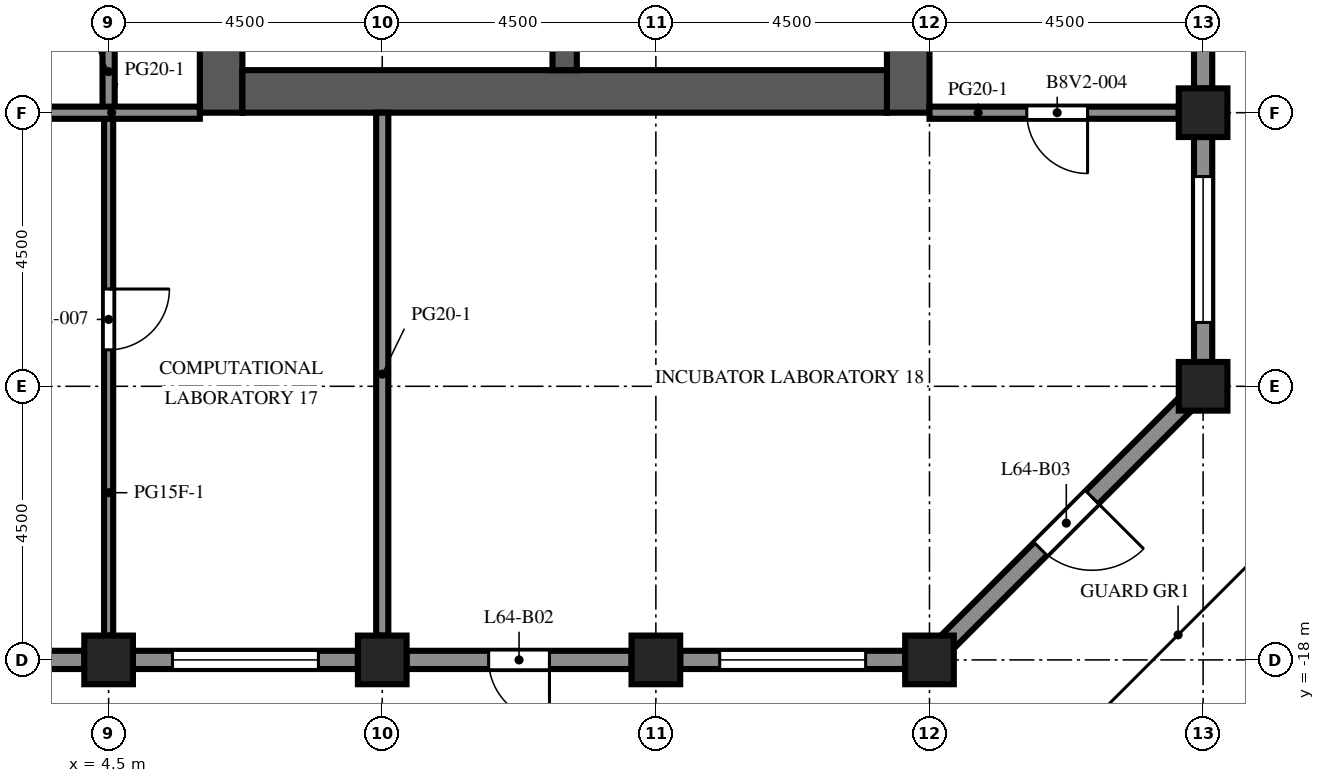
"""IFC4 building model, lengths in metres.
Left out: names, types, materials, properties, quantities, classifications, styles, units other than length and angle.
Written with IfcOpenShell. Run it as: python <this file> out.ifc"""

import sys

from ifc_helpers import new_model, si_unit, direction, frame, frame_2d, origin, origin_2d, place, context, subcontext, project, spatial, rectangle, extrude, element, fill, save


model = new_model("IFC4")
c1 = context("Model", 3, precision=1e-05, world=origin(), true_north=direction((0.0, 1.0)))
c2 = subcontext(c1, "Body", "Model", "MODEL_VIEW")
j1 = project(units=[si_unit("LENGTHUNIT", "METRE"), si_unit("PLANEANGLEUNIT", "RADIAN")], contexts=[c1])
p1 = place(None, origin())
s1 = spatial("IfcSite", under=j1, at=p1, CompositionType="ELEMENT")
p2 = place(p1, origin())
s2 = spatial("IfcBuilding", under=s1, at=p2, CompositionType="ELEMENT")
p3 = place(p2, frame((0.0, 0.0, 282.7)))
s3 = spatial("IfcBuildingStorey", under=s2, at=p3, CompositionType="ELEMENT", Elevation=282.7)
for number, where, z_axis, x_axis in (
    (1, (4.5, -18.0, 0.0), (0.0, 0.0, 1.0), (1.0, 0.0, 0.0)),
    (2, (9.0, -18.0, 0.0), (0.0, 0.0, 1.0), (1.0, 0.0, 0.0)),
    (3, (13.5, -18.0, 0.0), (0.0, 0.0, 1.0), (1.0, 0.0, 0.0)),
    (4, (18.0, -18.0, 0.0), (0.0, 0.0, 1.0), (1.0, 0.0, 0.0)),
    (5, (22.5, -13.5, 0.0), (0.0, 0.0, 1.0), (1.0, 0.0, 0.0)),
    (6, (22.5, -9.0, 0.0), (0.0, 0.0, 1.0), (1.0, 0.0, 0.0)),
):
    element("IfcColumn", number, at=place(p3, frame(where, z_axis=z_axis, x_axis=x_axis)), inside=s3, PredefinedType="COLUMN", context=c2, shape_type="SweptSolid", body=[
        extrude(rectangle(XDim=0.8, YDim=0.8, at=origin_2d()), origin(), (0.0, 0.0, 1.0), 4.1),
    ])
p4 = place(p3, frame((6.35, -9.0, 0.0), z_axis=(0.0, 0.0, 1.0), x_axis=(0.0, 1.0, 0.0)))
e7 = element("IfcWall", 7, at=p4, inside=s3, PredefinedType="SHEAR", context=c2, shape_type="SweptSolid", body=[
    extrude(rectangle(XDim=27.5, YDim=0.7, at=frame_2d((13.75, 0.0))), origin(), (0.0, 0.0, 1.0), 4.1),
])
p5 = place(p4, frame((12.55, 0.0, 0.0)))
e8 = element("IfcOpeningElement", 8, at=p5, cuts=e7, PredefinedType="OPENING", context=c2, shape_type="SweptSolid", body=[
    extrude(rectangle(XDim=2.4, YDim=2.4, at=frame_2d((1.2, 1.2))), frame((0.0, 0.36, 0.0), z_axis=(0.0, -1.0, 0.0), x_axis=(1.0, 0.0, 0.0)), (0.0, 0.0, 1.0), 0.72),
])
p6 = place(p4, frame((3.9, 0.0, 0.0)))
e9 = element("IfcOpeningElement", 9, at=p6, cuts=e7, PredefinedType="OPENING", context=c2, shape_type="SweptSolid", body=[
    extrude(rectangle(XDim=1.2, YDim=2.1, at=frame_2d((0.6, 1.05))), frame((0.0, 0.36, 0.0), z_axis=(0.0, -1.0, 0.0), x_axis=(1.0, 0.0, 0.0)), (0.0, 0.0, 1.0), 0.72),
])
p7 = place(p4, frame((22.4, 0.0, 0.0)))
e10 = element("IfcOpeningElement", 10, at=p7, cuts=e7, PredefinedType="OPENING", context=c2, shape_type="SweptSolid", body=[
    extrude(rectangle(XDim=1.2, YDim=2.1, at=frame_2d((0.6, 1.05))), frame((0.0, 0.36, 0.0), z_axis=(0.0, -1.0, 0.0), x_axis=(1.0, 0.0, 0.0)), (0.0, 0.0, 1.0), 0.72),
])
p8 = place(p3, frame((17.65, -9.0, 0.0), z_axis=(0.0, 0.0, 1.0), x_axis=(0.0, 1.0, 0.0)))
e11 = element("IfcWall", 11, at=p8, inside=s3, PredefinedType="SHEAR", context=c2, shape_type="SweptSolid", body=[
    extrude(rectangle(XDim=27.5, YDim=0.7, at=frame_2d((13.75, 0.0))), origin(), (0.0, 0.0, 1.0), 4.1),
])
p9 = place(p8, frame((12.55, 0.0, 0.0)))
e12 = element("IfcOpeningElement", 12, at=p9, cuts=e11, PredefinedType="OPENING", context=c2, shape_type="SweptSolid", body=[
    extrude(rectangle(XDim=2.4, YDim=2.4, at=frame_2d((1.2, 1.2))), frame((0.0, 0.36, 0.0), z_axis=(0.0, -1.0, 0.0), x_axis=(1.0, 0.0, 0.0)), (0.0, 0.0, 1.0), 0.72),
])
p10 = place(p8, frame((6.825, 0.0, 0.0)))
e13 = element("IfcOpeningElement", 13, at=p10, cuts=e11, PredefinedType="OPENING", context=c2, shape_type="SweptSolid", body=[
    extrude(rectangle(XDim=1.2, YDim=2.1, at=frame_2d((0.6, 1.05))), frame((0.0, 0.36, 0.0), z_axis=(0.0, -1.0, 0.0), x_axis=(1.0, 0.0, 0.0)), (0.0, 0.0, 1.0), 0.72),
])
p11 = place(p8, frame((19.475, 0.0, 0.0)))
e14 = element("IfcOpeningElement", 14, at=p11, cuts=e11, PredefinedType="OPENING", context=c2, shape_type="SweptSolid", body=[
    extrude(rectangle(XDim=1.2, YDim=2.1, at=frame_2d((0.6, 1.05))), frame((0.0, 0.36, 0.0), z_axis=(0.0, -1.0, 0.0), x_axis=(1.0, 0.0, 0.0)), (0.0, 0.0, 1.0), 0.72),
])
p12 = place(p3, frame((6.7, -8.65, 0.0), z_axis=(0.0, 0.0, 1.0), x_axis=(1.0, 0.0, 0.0)))
e15 = element("IfcWall", 15, at=p12, inside=s3, PredefinedType="SHEAR", context=c2, shape_type="SweptSolid", body=[
    extrude(rectangle(XDim=10.6, YDim=0.7, at=frame_2d((5.3, 0.0))), origin(), (0.0, 0.0, 1.0), 4.1),
])
p13 = place(p3, frame((12.0, -8.3, 0.0), z_axis=(0.0, 0.0, 1.0), x_axis=(0.0, 1.0, 0.0)))
e16 = element("IfcWall", 16, at=p13, inside=s3, PredefinedType="SHEAR", context=c2, shape_type="SweptSolid", body=[
    extrude(rectangle(XDim=7.6, YDim=0.4, at=frame_2d((3.8, 0.0))), origin(), (0.0, 0.0, 1.0), 4.1),
])
p14 = place(p3, frame((4.1, -18.0, 0.0), z_axis=(0.0, 0.0, 1.0), x_axis=(-1.0, 0.0, 0.0)))
e17 = element("IfcWall", 17, at=p14, inside=s3, PredefinedType="SOLIDWALL", context=c2, shape_type="SweptSolid", body=[
    extrude(rectangle(XDim=3.7, YDim=0.3, at=frame_2d((1.85, 0.0))), origin(), (0.0, 0.0, 1.0), 2.85),
])
p15 = place(p14, frame((0.65, 0.0, 0.8)))
e18 = element("IfcOpeningElement", 18, at=p15, cuts=e17, PredefinedType="OPENING", context=c2, shape_type="SweptSolid", body=[
    extrude(rectangle(XDim=2.4, YDim=1.7, at=frame_2d((1.2, 0.85))), frame((0.0, 0.16, 0.0), z_axis=(0.0, -1.0, 0.0), x_axis=(1.0, 0.0, 0.0)), (0.0, 0.0, 1.0), 0.32),
])
p16 = place(p3, frame((8.6, -18.0, 0.0), z_axis=(0.0, 0.0, 1.0), x_axis=(-1.0, 0.0, 0.0)))
e19 = element("IfcWall", 19, at=p16, inside=s3, PredefinedType="SOLIDWALL", context=c2, shape_type="SweptSolid", body=[
    extrude(rectangle(XDim=3.7, YDim=0.3, at=frame_2d((1.85, 0.0))), origin(), (0.0, 0.0, 1.0), 2.85),
])
p17 = place(p16, frame((0.65, 0.0, 0.8)))
e20 = element("IfcOpeningElement", 20, at=p17, cuts=e19, PredefinedType="OPENING", context=c2, shape_type="SweptSolid", body=[
    extrude(rectangle(XDim=2.4, YDim=1.7, at=frame_2d((1.2, 0.85))), frame((0.0, 0.16, 0.0), z_axis=(0.0, -1.0, 0.0), x_axis=(1.0, 0.0, 0.0)), (0.0, 0.0, 1.0), 0.32),
])
p18 = place(p3, frame((13.1, -18.0, 0.0), z_axis=(0.0, 0.0, 1.0), x_axis=(-1.0, 0.0, 0.0)))
e21 = element("IfcWall", 21, at=p18, inside=s3, PredefinedType="SOLIDWALL", context=c2, shape_type="SweptSolid", body=[
    extrude(rectangle(XDim=3.7, YDim=0.3, at=frame_2d((1.85, 0.0))), origin(), (0.0, 0.0, 1.0), 2.85),
])
p19 = place(p18, frame((1.35, 0.0, 0.0)))
e22 = element("IfcOpeningElement", 22, at=p19, cuts=e21, PredefinedType="OPENING", context=c2, shape_type="SweptSolid", body=[
    extrude(rectangle(XDim=1.0, YDim=2.2, at=frame_2d((0.5, 1.1))), frame((0.0, 0.16, 0.0), z_axis=(0.0, -1.0, 0.0), x_axis=(1.0, 0.0, 0.0)), (0.0, 0.0, 1.0), 0.32),
])
p20 = place(p3, frame((17.6, -18.0, 0.0), z_axis=(0.0, 0.0, 1.0), x_axis=(-1.0, 0.0, 0.0)))
e23 = element("IfcWall", 23, at=p20, inside=s3, PredefinedType="SOLIDWALL", context=c2, shape_type="SweptSolid", body=[
    extrude(rectangle(XDim=3.7, YDim=0.3, at=frame_2d((1.85, 0.0))), origin(), (0.0, 0.0, 1.0), 2.85),
])
p21 = place(p20, frame((0.65, 0.0, 0.8)))
e24 = element("IfcOpeningElement", 24, at=p21, cuts=e23, PredefinedType="OPENING", context=c2, shape_type="SweptSolid", body=[
    extrude(rectangle(XDim=2.4, YDim=1.7, at=frame_2d((1.2, 0.85))), frame((0.0, 0.16, 0.0), z_axis=(0.0, -1.0, 0.0), x_axis=(1.0, 0.0, 0.0)), (0.0, 0.0, 1.0), 0.32),
])
p22 = place(p3, frame((22.206, -13.794, 0.0), z_axis=(0.0, 0.0, 1.0), x_axis=(-0.707106781187, -0.707106781187, 0.0)))
e25 = element("IfcWall", 25, at=p22, inside=s3, PredefinedType="SOLIDWALL", context=c2, shape_type="SweptSolid", body=[
    extrude(rectangle(XDim=5.532, YDim=0.3, at=frame_2d((2.766, 0.0))), origin(), (0.0, 0.0, 1.0), 2.85),
])
p23 = place(p22, frame((2.166, 0.0, 0.0)))
e26 = element("IfcOpeningElement", 26, at=p23, cuts=e25, PredefinedType="OPENING", context=c2, shape_type="SweptSolid", body=[
    extrude(rectangle(XDim=1.2, YDim=2.2, at=frame_2d((0.6, 1.1))), frame((0.0, 0.16, 0.0), z_axis=(0.0, -1.0, 0.0), x_axis=(1.0, 0.0, 0.0)), (0.0, 0.0, 1.0), 0.32),
])
p24 = place(p3, frame((22.5, -9.4, 0.0), z_axis=(0.0, 0.0, 1.0), x_axis=(0.0, -1.0, 0.0)))
e27 = element("IfcWall", 27, at=p24, inside=s3, PredefinedType="SOLIDWALL", context=c2, shape_type="SweptSolid", body=[
    extrude(rectangle(XDim=3.7, YDim=0.3, at=frame_2d((1.85, 0.0))), origin(), (0.0, 0.0, 1.0), 2.85),
])
p25 = place(p24, frame((0.65, 0.0, 0.8)))
e28 = element("IfcOpeningElement", 28, at=p25, cuts=e27, PredefinedType="OPENING", context=c2, shape_type="SweptSolid", body=[
    extrude(rectangle(XDim=2.4, YDim=1.7, at=frame_2d((1.2, 0.85))), frame((0.0, 0.16, 0.0), z_axis=(0.0, -1.0, 0.0), x_axis=(1.0, 0.0, 0.0)), (0.0, 0.0, 1.0), 0.32),
])
p26 = place(p3, frame((22.5, -4.9, 0.0), z_axis=(0.0, 0.0, 1.0), x_axis=(0.0, -1.0, 0.0)))
e29 = element("IfcWall", 29, at=p26, inside=s3, PredefinedType="SOLIDWALL", context=c2, shape_type="SweptSolid", body=[
    extrude(rectangle(XDim=3.7, YDim=0.3, at=frame_2d((1.85, 0.0))), origin(), (0.0, 0.0, 1.0), 2.85),
])
p27 = place(p26, frame((1.35, 0.0, 0.0)))
e30 = element("IfcOpeningElement", 30, at=p27, cuts=e29, PredefinedType="OPENING", context=c2, shape_type="SweptSolid", body=[
    extrude(rectangle(XDim=1.0, YDim=2.2, at=frame_2d((0.5, 1.1))), frame((0.0, 0.16, 0.0), z_axis=(0.0, -1.0, 0.0), x_axis=(1.0, 0.0, 0.0)), (0.0, 0.0, 1.0), 0.32),
])
p28 = place(p3, frame((8.2, -8.3, 0.0), z_axis=(0.0, 0.0, 1.0), x_axis=(0.0, 1.0, 0.0)))
e31 = element("IfcWall", 31, at=p28, inside=s3, PredefinedType="PARTITIONING", context=c2, shape_type="SweptSolid", body=[
    extrude(rectangle(XDim=2.28, YDim=0.1, at=frame_2d((1.14, 0.0))), origin(), (0.0, 0.0, 1.0), 3.65),
])
p29 = place(p28, frame((0.64, 0.0, 0.0)))
e32 = element("IfcOpeningElement", 32, at=p29, cuts=e31, PredefinedType="OPENING", context=c2, shape_type="SweptSolid", body=[
    extrude(rectangle(XDim=1.0, YDim=2.1, at=frame_2d((0.5, 1.05))), frame((0.0, 0.06, 0.0), z_axis=(0.0, -1.0, 0.0), x_axis=(1.0, 0.0, 0.0)), (0.0, 0.0, 1.0), 0.12),
])
p30 = place(p3, frame((4.5, -9.0, 0.0), z_axis=(0.0, 0.0, 1.0), x_axis=(0.0, -1.0, 0.0)))
e33 = element("IfcWall", 33, at=p30, inside=s3, PredefinedType="PARTITIONING", context=c2, shape_type="SweptSolid", body=[
    extrude(rectangle(XDim=8.6, YDim=0.15, at=frame_2d((4.3, 0.0))), origin(), (0.0, 0.0, 1.0), 3.65),
])
p31 = place(p30, frame((2.9, 0.0, 0.0)))
e34 = element("IfcOpeningElement", 34, at=p31, cuts=e33, PredefinedType="OPENING", context=c2, shape_type="SweptSolid", body=[
    extrude(rectangle(XDim=1.0, YDim=2.1, at=frame_2d((0.5, 1.05))), frame((0.0, 0.085, 0.0), z_axis=(0.0, -1.0, 0.0), x_axis=(1.0, 0.0, 0.0)), (0.0, 0.0, 1.0), 0.17),
])
p32 = place(p3, frame((4.5, -6.0, 0.0), z_axis=(0.0, 0.0, 1.0), x_axis=(0.0, -1.0, 0.0)))
e35 = element("IfcWall", 35, at=p32, inside=s3, PredefinedType="PARTITIONING", context=c2, shape_type="SweptSolid", body=[
    extrude(rectangle(XDim=3.0, YDim=0.2, at=frame_2d((1.5, 0.0))), origin(), (0.0, 0.0, 1.0), 3.65),
])
p33 = place(p32, frame((0.65, 0.0, 0.0)))
e36 = element("IfcOpeningElement", 36, at=p33, cuts=e35, PredefinedType="OPENING", context=c2, shape_type="SweptSolid", body=[
    extrude(rectangle(XDim=1.0, YDim=2.1, at=frame_2d((0.5, 1.05))), frame((0.0, 0.11, 0.0), z_axis=(0.0, -1.0, 0.0), x_axis=(1.0, 0.0, 0.0)), (0.0, 0.0, 1.0), 0.22),
])
p34 = place(p3, frame((9.0, -17.6, 0.0), z_axis=(0.0, 0.0, 1.0), x_axis=(0.0, 1.0, 0.0)))
e37 = element("IfcWall", 37, at=p34, inside=s3, PredefinedType="PARTITIONING", context=c2, shape_type="SweptSolid", body=[
    extrude(rectangle(XDim=8.6, YDim=0.2, at=frame_2d((4.3, 0.0))), origin(), (0.0, 0.0, 1.0), 3.65),
])
p35 = place(p3, frame((6.0, -9.0, 0.0), z_axis=(0.0, 0.0, 1.0), x_axis=(-1.0, 0.0, 0.0)))
e38 = element("IfcWall", 38, at=p35, inside=s3, PredefinedType="PARTITIONING", context=c2, shape_type="SweptSolid", body=[
    extrude(rectangle(XDim=4.5, YDim=0.2, at=frame_2d((2.25, 0.0))), origin(), (0.0, 0.0, 1.0), 3.65),
])
p36 = place(p35, frame((2.9, 0.0, 0.0)))
e39 = element("IfcOpeningElement", 39, at=p36, cuts=e38, PredefinedType="OPENING", context=c2, shape_type="SweptSolid", body=[
    extrude(rectangle(XDim=1.0, YDim=2.1, at=frame_2d((0.5, 1.05))), frame((0.0, 0.11, 0.0), z_axis=(0.0, -1.0, 0.0), x_axis=(1.0, 0.0, 0.0)), (0.0, 0.0, 1.0), 0.22),
])
p37 = place(p3, frame((22.1, -9.0, 0.0), z_axis=(0.0, 0.0, 1.0), x_axis=(-1.0, 0.0, 0.0)))
e40 = element("IfcWall", 40, at=p37, inside=s3, PredefinedType="PARTITIONING", context=c2, shape_type="SweptSolid", body=[
    extrude(rectangle(XDim=4.1, YDim=0.2, at=frame_2d((2.05, 0.0))), origin(), (0.0, 0.0, 1.0), 3.65),
])
p38 = place(p37, frame((1.5, 0.0, 0.0)))
e41 = element("IfcOpeningElement", 41, at=p38, cuts=e40, PredefinedType="OPENING", context=c2, shape_type="SweptSolid", body=[
    extrude(rectangle(XDim=1.0, YDim=2.1, at=frame_2d((0.5, 1.05))), frame((0.0, 0.11, 0.0), z_axis=(0.0, -1.0, 0.0), x_axis=(1.0, 0.0, 0.0)), (0.0, 0.0, 1.0), 0.22),
])
p39 = place(p17, origin())
e42 = element("IfcWindow", 42, at=p39, inside=s3, PartitioningType="SINGLE_PANEL", PredefinedType="WINDOW", context=c2, shape_type="SweptSolid", body=[
    extrude(rectangle(XDim=2.4, YDim=1.7, at=frame_2d((1.2, 0.85))), frame((0.0, 0.03, 0.0), z_axis=(0.0, -1.0, 0.0), x_axis=(1.0, 0.0, 0.0)), (0.0, 0.0, 1.0), 0.06),
])
fill(e20, e42)
p40 = place(p19, origin())
e43 = element("IfcDoor", 43, at=p40, inside=s3, OperationType="SINGLE_SWING_LEFT", PredefinedType="DOOR", context=c2, shape_type="SweptSolid", body=[
    extrude(rectangle(XDim=1.0, YDim=2.2, at=frame_2d((0.5, 1.1))), frame((0.0, 0.025, 0.0), z_axis=(0.0, -1.0, 0.0), x_axis=(1.0, 0.0, 0.0)), (0.0, 0.0, 1.0), 0.05),
])
fill(e22, e43)
p41 = place(p21, origin())
e44 = element("IfcWindow", 44, at=p41, inside=s3, PartitioningType="SINGLE_PANEL", PredefinedType="WINDOW", context=c2, shape_type="SweptSolid", body=[
    extrude(rectangle(XDim=2.4, YDim=1.7, at=frame_2d((1.2, 0.85))), frame((0.0, 0.03, 0.0), z_axis=(0.0, -1.0, 0.0), x_axis=(1.0, 0.0, 0.0)), (0.0, 0.0, 1.0), 0.06),
])
fill(e24, e44)
p42 = place(p23, origin())
e45 = element("IfcDoor", 45, at=p42, inside=s3, OperationType="SINGLE_SWING_LEFT", PredefinedType="DOOR", context=c2, shape_type="SweptSolid", body=[
    extrude(rectangle(XDim=1.2, YDim=2.2, at=frame_2d((0.6, 1.1))), frame((0.0, 0.025, 0.0), z_axis=(0.0, -1.0, 0.0), x_axis=(1.0, 0.0, 0.0)), (0.0, 0.0, 1.0), 0.05),
])
fill(e26, e45)
p43 = place(p25, origin())
e46 = element("IfcWindow", 46, at=p43, inside=s3, PartitioningType="SINGLE_PANEL", PredefinedType="WINDOW", context=c2, shape_type="SweptSolid", body=[
    extrude(rectangle(XDim=2.4, YDim=1.7, at=frame_2d((1.2, 0.85))), frame((0.0, 0.03, 0.0), z_axis=(0.0, -1.0, 0.0), x_axis=(1.0, 0.0, 0.0)), (0.0, 0.0, 1.0), 0.06),
])
fill(e28, e46)
p44 = place(p38, origin())
e47 = element("IfcDoor", 47, at=p44, inside=s3, OperationType="SINGLE_SWING_LEFT", PredefinedType="DOOR", context=c2, shape_type="SweptSolid", body=[
    extrude(rectangle(XDim=1.0, YDim=2.1, at=frame_2d((0.5, 1.05))), frame((0.0, 0.025, 0.0), z_axis=(0.0, -1.0, 0.0), x_axis=(1.0, 0.0, 0.0)), (0.0, 0.0, 1.0), 0.05),
])
fill(e41, e47)
p45 = place(p31, origin())
e48 = element("IfcDoor", 48, at=p45, inside=s3, OperationType="SINGLE_SWING_LEFT", PredefinedType="DOOR", context=c2, shape_type="SweptSolid", body=[
    extrude(rectangle(XDim=1.0, YDim=2.1, at=frame_2d((0.5, 1.05))), frame((0.0, 0.025, 0.0), z_axis=(0.0, -1.0, 0.0), x_axis=(1.0, 0.0, 0.0)), (0.0, 0.0, 1.0), 0.05),
])
fill(e34, e48)
save(model, sys.argv[1])
